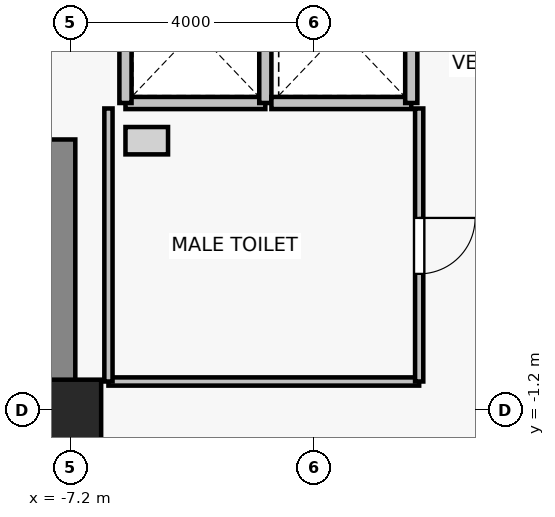
"""IFC4 building model, lengths in metres.
Left out: names, types, materials, properties, quantities, classifications, styles, units other than length and angle.
Written with IfcOpenShell. Run it as: python <this file> out.ifc"""

import sys

from ifc_helpers import new_model, si_unit, direction, frame, frame_2d, origin, origin_2d, place, context, subcontext, project, spatial, rectangle, extrude, source, transform, mapped, element, fill, save


model = new_model("IFC4")
c1 = context("Model", 3, precision=1e-05, world=origin(), true_north=direction((0.0, 1.0)))
c2 = subcontext(c1, "Body", "Model", "MODEL_VIEW")
j1 = project(units=[si_unit("LENGTHUNIT", "METRE"), si_unit("PLANEANGLEUNIT", "RADIAN")], contexts=[c1])
p1 = place(None, origin())
s1 = spatial("IfcSite", under=j1, at=p1, CompositionType="ELEMENT")
p2 = place(p1, origin())
s2 = spatial("IfcBuilding", under=s1, at=p2, CompositionType="ELEMENT")
p3 = place(p2, frame((0.0, 0.0, 162.7)))
s3 = spatial("IfcBuildingStorey", under=s2, at=p3, CompositionType="ELEMENT", Elevation=162.7)
p4 = place(p3, frame((-7.2, -1.2, 0.0), z_axis=(0.0, 0.0, 1.0), x_axis=(1.0, 0.0, 0.0)))
e1 = element("IfcColumn", 1, at=p4, inside=s3, PredefinedType="COLUMN", context=c2, shape_type="SweptSolid", body=[
    extrude(rectangle(XDim=1.0, YDim=1.0, at=origin_2d()), origin(), (0.0, 0.0, 1.0), 3.3),
])
p5 = place(p3, frame((-7.4, -0.825, 0.0), z_axis=(0.0, 0.0, 1.0), x_axis=(0.0, 1.0, 0.0)))
e2 = element("IfcWall", 2, at=p5, inside=s3, PredefinedType="SHEAR", context=c2, shape_type="SweptSolid", body=[
    extrude(rectangle(XDim=4.075, YDim=0.55, at=frame_2d((2.038, 0.0))), origin(), (0.0, 0.0, 1.0), 3.075),
])
p6 = place(p3, frame((-4.0, 3.85, 0.0), z_axis=(0.0, 0.0, 1.0), x_axis=(-1.0, 0.0, 0.0)))
e3 = element("IfcWall", 3, at=p6, inside=s3, PredefinedType="SOLIDWALL", context=c2, shape_type="SweptSolid", body=[
    extrude(rectangle(XDim=2.3, YDim=0.2, at=frame_2d((1.15, 0.0))), origin(), (0.0, 0.0, 1.0), 3.075),
])
for number, where, z_axis, x_axis in (
    (4, (-6.3, 3.85, 0.0), (0.0, 0.0, 1.0), (0.0, 1.0, 0.0)),
    (5, (-4.0, 6.25, 0.0), (0.0, 0.0, 1.0), (0.0, -1.0, 0.0)),
):
    element("IfcWall", number, at=place(p3, frame(where, z_axis=z_axis, x_axis=x_axis)), inside=s3, PredefinedType="SOLIDWALL", context=c2, shape_type="SweptSolid", body=[
        extrude(rectangle(XDim=2.4, YDim=0.2, at=frame_2d((1.2, 0.0))), origin(), (0.0, 0.0, 1.0), 3.075),
    ])
p7 = place(p3, frame((-1.6, 3.85, 0.0), z_axis=(0.0, 0.0, 1.0), x_axis=(-1.0, 0.0, 0.0)))
e6 = element("IfcWall", 6, at=p7, inside=s3, PredefinedType="SOLIDWALL", context=c2, shape_type="SweptSolid", body=[
    extrude(rectangle(XDim=2.3, YDim=0.2, at=frame_2d((1.15, 0.0))), origin(), (0.0, 0.0, 1.0), 3.075),
])
p8 = place(p3, frame((-1.6, 6.25, 0.0), z_axis=(0.0, 0.0, 1.0), x_axis=(0.0, -1.0, 0.0)))
e7 = element("IfcWall", 7, at=p8, inside=s3, PredefinedType="SOLIDWALL", context=c2, shape_type="SweptSolid", body=[
    extrude(rectangle(XDim=2.4, YDim=0.2, at=frame_2d((1.2, 0.0))), origin(), (0.0, 0.0, 1.0), 3.075),
])
p9 = place(p3, frame((-1.47, -0.73, 0.0), z_axis=(0.0, 0.0, 1.0), x_axis=(-1.0, 0.0, 0.0)))
e8 = element("IfcWall", 8, at=p9, inside=s3, PredefinedType="PARTITIONING", context=c2, shape_type="SweptSolid", body=[
    extrude(rectangle(XDim=5.11, YDim=0.135, at=frame_2d((2.555, 0.0))), origin(), (0.0, 0.0, 1.0), 3.075),
])
p10 = place(p3, frame((-6.58, -0.73, 0.0), z_axis=(0.0, 0.0, 1.0), x_axis=(0.0, 1.0, 0.0)))
e9 = element("IfcWall", 9, at=p10, inside=s3, PredefinedType="PARTITIONING", context=c2, shape_type="SweptSolid", body=[
    extrude(rectangle(XDim=4.49, YDim=0.135, at=frame_2d((2.245, 0.0))), origin(), (0.0, 0.0, 1.0), 3.075),
])
p11 = place(p3, frame((-1.47, 3.76, 0.0), z_axis=(0.0, 0.0, 1.0), x_axis=(0.0, -1.0, 0.0)))
e10 = element("IfcWall", 10, at=p11, inside=s3, PredefinedType="PARTITIONING", context=c2, shape_type="SweptSolid", body=[
    extrude(rectangle(XDim=4.49, YDim=0.135, at=frame_2d((2.245, 0.0))), origin(), (0.0, 0.0, 1.0), 3.075),
])
p12 = place(p11, frame((1.8, 0.0, 0.0)))
e11 = element("IfcOpeningElement", 11, at=p12, cuts=e10, PredefinedType="OPENING", context=c2, shape_type="SweptSolid", body=[
    extrude(rectangle(XDim=0.92, YDim=2.1, at=frame_2d((0.46, 1.05))), frame((0.0, 0.077, 0.0), z_axis=(0.0, -1.0, 0.0), x_axis=(1.0, 0.0, 0.0)), (0.0, 0.0, 1.0), 0.155),
])
m1 = source(origin(), c2, "Body", "SweptSolid", [
    extrude(rectangle(XDim=0.92, YDim=2.1, at=frame_2d((0.46, 1.05))), frame((0.0, 0.025, 0.0), z_axis=(0.0, -1.0, 0.0), x_axis=(1.0, 0.0, 0.0)), (0.0, 0.0, 1.0), 0.05),
])
p13 = place(p12, origin())
e12 = element("IfcDoor", 12, at=p13, inside=s3, OperationType="SINGLE_SWING_LEFT", PredefinedType="DOOR", context=c2, shape_type="MappedRepresentation", body=[
    mapped(m1, transform((0.0, 0.0, 0.0), x_axis=(1.0, 0.0, 0.0), y_axis=(0.0, 1.0, 0.0), z_axis=(0.0, 0.0, 1.0), scale=1.0)),
])
fill(e11, e12)
save(model, sys.argv[1])
